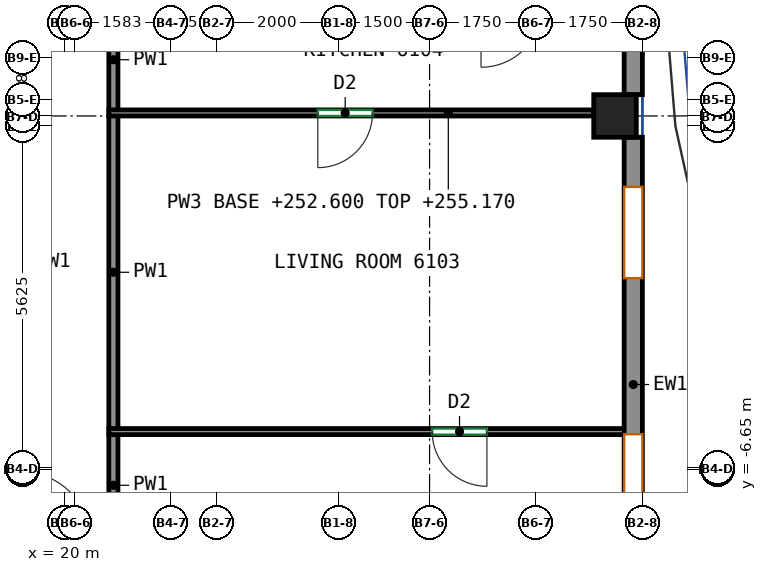
"""IFC4 building model, lengths in metres.
Left out: names, types, materials, properties, quantities, classifications, styles, units other than length and angle.
Written with IfcOpenShell. Run it as: python <this file> out.ifc"""

import sys

from ifc_helpers import new_model, si_unit, direction, frame, frame_2d, origin, origin_2d, place, context, subcontext, project, spatial, rectangle, extrude, source, transform, mapped, element, fill, save


model = new_model("IFC4")
c1 = context("Model", 3, precision=1e-05, world=origin(), true_north=direction((0.0, 1.0)))
c2 = subcontext(c1, "Body", "Model", "MODEL_VIEW")
j1 = project(units=[si_unit("LENGTHUNIT", "METRE"), si_unit("PLANEANGLEUNIT", "RADIAN")], contexts=[c1])
p1 = place(None, origin())
s1 = spatial("IfcSite", under=j1, at=p1, CompositionType="ELEMENT")
p2 = place(p1, origin())
s2 = spatial("IfcBuilding", under=s1, at=p2, CompositionType="ELEMENT")
p3 = place(p2, frame((0.0, 0.0, 252.6)))
s3 = spatial("IfcBuildingStorey", under=s2, at=p3, CompositionType="ELEMENT", Elevation=252.6)
m1 = source(origin(), c2, "Body", "SweptSolid", [
    extrude(rectangle(XDim=0.7, YDim=0.7, at=origin_2d()), origin(), (0.0, 0.0, 1.0), 3.12),
])
p4 = place(p3, frame((29.05, -0.833, 0.0), z_axis=(0.0, 0.0, 1.0), x_axis=(1.0, 0.0, 0.0)))
e1 = element("IfcColumn", 1, at=p4, inside=s3, PredefinedType="COLUMN", context=c2, shape_type="MappedRepresentation", body=[
    mapped(m1, transform((0.0, 0.0, 0.0))),
])
m2 = source(origin(), c2, "Body", "SweptSolid", [
    extrude(rectangle(XDim=8.133, YDim=0.3, at=frame_2d((4.067, 0.0))), origin(), (0.0, 0.0, 1.0), 3.12),
])
p5 = place(p3, frame((29.35, -9.317, 0.0), z_axis=(0.0, 0.0, 1.0), x_axis=(0.0, 1.0, 0.0)))
e2 = element("IfcWall", 2, at=p5, inside=s3, PredefinedType="SOLIDWALL", context=c2, shape_type="MappedRepresentation", body=[
    mapped(m2, transform((0.0, 0.0, 0.0))),
])
p6 = place(p5, frame((1.75, 0.0, 0.8)))
e3 = element("IfcOpeningElement", 3, at=p6, cuts=e2, PredefinedType="OPENING", context=c2, shape_type="SweptSolid", body=[
    extrude(rectangle(XDim=1.5, YDim=2.05, at=frame_2d((0.75, 1.025))), frame((0.0, 0.16, 0.0), z_axis=(0.0, -1.0, 0.0), x_axis=(1.0, 0.0, 0.0)), (0.0, 0.0, 1.0), 0.32),
])
p7 = place(p5, frame((0.45, 0.0, 0.0)))
e4 = element("IfcOpeningElement", 4, at=p7, cuts=e2, PredefinedType="OPENING", context=c2, shape_type="SweptSolid", body=[
    extrude(rectangle(XDim=1.0, YDim=2.1, at=frame_2d((0.5, 1.05))), frame((0.0, 0.16, 0.0), z_axis=(0.0, -1.0, 0.0), x_axis=(1.0, 0.0, 0.0)), (0.0, 0.0, 1.0), 0.32),
])
p8 = place(p5, frame((5.817, 0.0, 0.8)))
e5 = element("IfcOpeningElement", 5, at=p8, cuts=e2, PredefinedType="OPENING", context=c2, shape_type="SweptSolid", body=[
    extrude(rectangle(XDim=1.5, YDim=2.05, at=frame_2d((0.75, 1.025))), frame((0.0, 0.16, 0.0), z_axis=(0.0, -1.0, 0.0), x_axis=(1.0, 0.0, 0.0)), (0.0, 0.0, 1.0), 0.32),
])
p9 = place(p3, frame((29.35, -0.483, 0.0), z_axis=(0.0, 0.0, 1.0), x_axis=(0.0, 1.0, 0.0)))
e6 = element("IfcWall", 6, at=p9, inside=s3, PredefinedType="SOLIDWALL", context=c2, shape_type="MappedRepresentation", body=[
    mapped(m2, transform((0.0, 0.0, 0.0))),
])
p10 = place(p9, frame((1.75, 0.0, 0.8)))
e7 = element("IfcOpeningElement", 7, at=p10, cuts=e6, PredefinedType="OPENING", context=c2, shape_type="SweptSolid", body=[
    extrude(rectangle(XDim=1.5, YDim=2.05, at=frame_2d((0.75, 1.025))), frame((0.0, 0.16, 0.0), z_axis=(0.0, -1.0, 0.0), x_axis=(1.0, 0.0, 0.0)), (0.0, 0.0, 1.0), 0.32),
])
p11 = place(p9, frame((5.817, 0.0, 0.8)))
e8 = element("IfcOpeningElement", 8, at=p11, cuts=e6, PredefinedType="OPENING", context=c2, shape_type="SweptSolid", body=[
    extrude(rectangle(XDim=1.5, YDim=2.05, at=frame_2d((0.75, 1.025))), frame((0.0, 0.16, 0.0), z_axis=(0.0, -1.0, 0.0), x_axis=(1.0, 0.0, 0.0)), (0.0, 0.0, 1.0), 0.32),
])
p12 = place(p3, frame((20.8, -7.75, 0.0), z_axis=(0.0, 0.0, 1.0), x_axis=(0.0, 1.0, 0.0)))
e9 = element("IfcWall", 9, at=p12, inside=s3, PredefinedType="PARTITIONING", context=c2, shape_type="SweptSolid", body=[
    extrude(rectangle(XDim=1.686, YDim=0.15, at=frame_2d((0.843, 0.0))), origin(), (0.0, 0.0, 1.0), 3.12),
])
p13 = place(p3, frame((20.8, -5.984, 0.0), z_axis=(0.0, 0.0, 1.0), x_axis=(0.0, 1.0, 0.0)))
e10 = element("IfcWall", 10, at=p13, inside=s3, PredefinedType="PARTITIONING", context=c2, shape_type="SweptSolid", body=[
    extrude(rectangle(XDim=5.16, YDim=0.15, at=frame_2d((2.58, 0.0))), origin(), (0.0, 0.0, 1.0), 3.12),
])
p14 = place(p3, frame((20.8, -0.744, 0.0), z_axis=(0.0, 0.0, 1.0), x_axis=(0.0, 1.0, 0.0)))
e11 = element("IfcWall", 11, at=p14, inside=s3, PredefinedType="PARTITIONING", context=c2, shape_type="SweptSolid", body=[
    extrude(rectangle(XDim=1.671, YDim=0.15, at=frame_2d((0.835, 0.0))), origin(), (0.0, 0.0, 1.0), 3.12),
])
p15 = place(p3, frame((29.25, -6.024, 0.0), z_axis=(0.0, 0.0, 1.0), x_axis=(-1.0, 0.0, 0.0)))
e12 = element("IfcWall", 12, at=p15, inside=s3, PredefinedType="PARTITIONING", context=c2, shape_type="SweptSolid", body=[
    extrude(rectangle(XDim=8.523, YDim=0.1, at=frame_2d((4.261, 0.0))), origin(), (0.0, 0.0, 1.0), 3.12),
])
p16 = place(p15, frame((2.307, 0.0, 0.0)))
e13 = element("IfcOpeningElement", 13, at=p16, cuts=e12, PredefinedType="OPENING", context=c2, shape_type="SweptSolid", body=[
    extrude(rectangle(XDim=0.9, YDim=2.1, at=frame_2d((0.45, 1.05))), frame((0.0, 0.06, 0.0), z_axis=(0.0, -1.0, 0.0), x_axis=(1.0, 0.0, 0.0)), (0.0, 0.0, 1.0), 0.12),
])
p17 = place(p3, frame((28.7, -0.784, 0.0), z_axis=(0.0, 0.0, 1.0), x_axis=(-1.0, 0.0, 0.0)))
e14 = element("IfcWall", 14, at=p17, inside=s3, PredefinedType="PARTITIONING", context=c2, shape_type="SweptSolid", body=[
    extrude(rectangle(XDim=7.973, YDim=0.1, at=frame_2d((3.986, 0.0))), origin(), (0.0, 0.0, 1.0), 2.57),
])
p18 = place(p17, frame((3.638, 0.0, 0.0)))
e15 = element("IfcOpeningElement", 15, at=p18, cuts=e14, PredefinedType="OPENING", context=c2, shape_type="SweptSolid", body=[
    extrude(rectangle(XDim=0.9, YDim=2.1, at=frame_2d((0.45, 1.05))), frame((0.0, 0.06, 0.0), z_axis=(0.0, -1.0, 0.0), x_axis=(1.0, 0.0, 0.0)), (0.0, 0.0, 1.0), 0.12),
])
p19 = place(p6, origin())
e16 = element("IfcWindow", 16, at=p19, inside=s3, PartitioningType="SINGLE_PANEL", PredefinedType="WINDOW", context=c2, shape_type="SweptSolid", body=[
    extrude(rectangle(XDim=1.5, YDim=2.05, at=frame_2d((0.75, 1.025))), frame((0.0, 0.03, 0.0), z_axis=(0.0, -1.0, 0.0), x_axis=(1.0, 0.0, 0.0)), (0.0, 0.0, 1.0), 0.06),
])
fill(e3, e16)
p20 = place(p8, origin())
e17 = element("IfcWindow", 17, at=p20, inside=s3, PartitioningType="SINGLE_PANEL", PredefinedType="WINDOW", context=c2, shape_type="SweptSolid", body=[
    extrude(rectangle(XDim=1.5, YDim=2.05, at=frame_2d((0.75, 1.025))), frame((0.0, 0.03, 0.0), z_axis=(0.0, -1.0, 0.0), x_axis=(1.0, 0.0, 0.0)), (0.0, 0.0, 1.0), 0.06),
])
fill(e5, e17)
p21 = place(p16, origin())
e18 = element("IfcDoor", 18, at=p21, inside=s3, OperationType="SINGLE_SWING_LEFT", PredefinedType="DOOR", context=c2, shape_type="SweptSolid", body=[
    extrude(rectangle(XDim=0.9, YDim=2.1, at=frame_2d((0.45, 1.05))), frame((0.0, 0.025, 0.0), z_axis=(0.0, -1.0, 0.0), x_axis=(1.0, 0.0, 0.0)), (0.0, 0.0, 1.0), 0.05),
])
fill(e13, e18)
p22 = place(p18, origin())
e19 = element("IfcDoor", 19, at=p22, inside=s3, OperationType="SINGLE_SWING_RIGHT", PredefinedType="DOOR", context=c2, shape_type="SweptSolid", body=[
    extrude(rectangle(XDim=0.9, YDim=2.1, at=frame_2d((0.45, 1.05))), frame((0.0, 0.025, 0.0), z_axis=(0.0, -1.0, 0.0), x_axis=(1.0, 0.0, 0.0)), (0.0, 0.0, 1.0), 0.05),
])
fill(e15, e19)
save(model, sys.argv[1])
